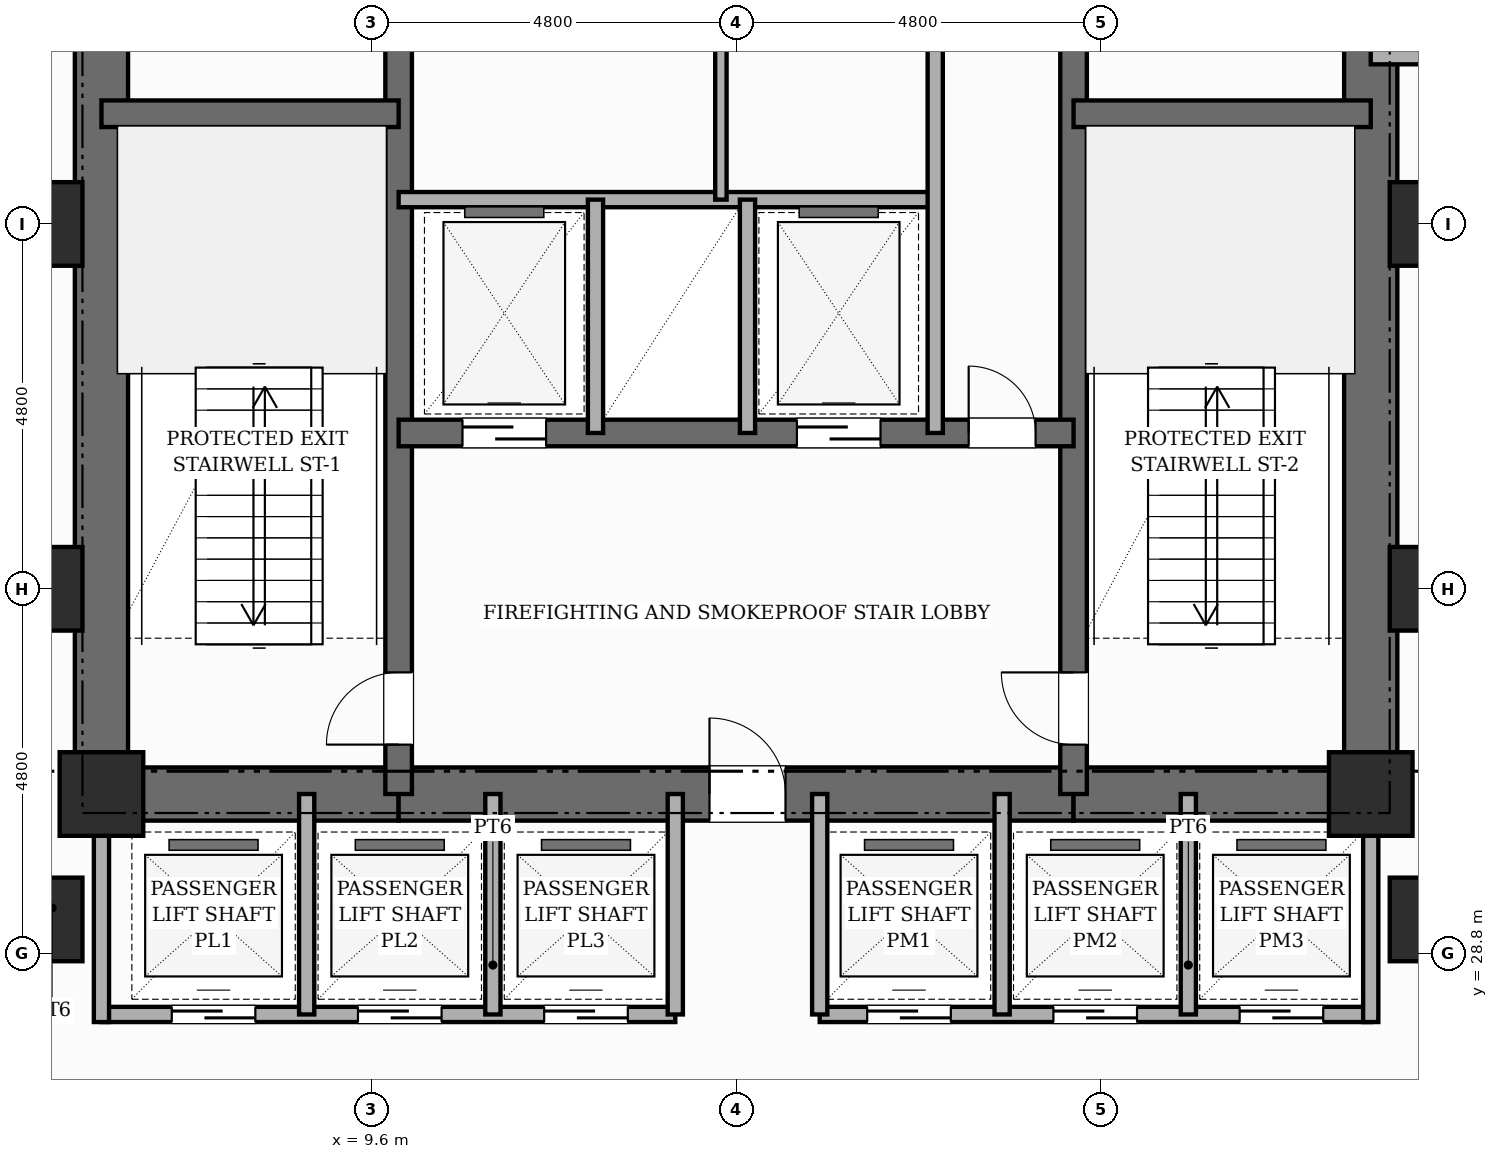
"""IFC4 building model, lengths in metres.
Left out: names, types, materials, properties, quantities, classifications, styles, units other than length and angle.
Written with IfcOpenShell. Run it as: python <this file> out.ifc"""

import sys

from ifc_helpers import new_model, si_unit, direction, frame, frame_2d, origin, origin_2d, place, context, subcontext, project, spatial, rectangle, extrude, element, fill, save


model = new_model("IFC4")
c1 = context("Model", 3, precision=1e-05, world=origin(), true_north=direction((0.0, 1.0)))
c2 = subcontext(c1, "Body", "Model", "MODEL_VIEW")
j1 = project(units=[si_unit("LENGTHUNIT", "METRE"), si_unit("PLANEANGLEUNIT", "RADIAN")], contexts=[c1])
p1 = place(None, origin())
s1 = spatial("IfcSite", under=j1, at=p1, CompositionType="ELEMENT")
p2 = place(p1, origin())
s2 = spatial("IfcBuilding", under=s1, at=p2, CompositionType="ELEMENT")
p3 = place(p2, frame((0.0, 0.0, 97.0)))
s3 = spatial("IfcBuildingStorey", under=s2, at=p3, CompositionType="ELEMENT", Elevation=97.0)
p4 = place(p3, frame((6.05, 30.55, 0.0), z_axis=(0.0, 0.0, 1.0), x_axis=(0.0, 1.0, 0.0)))
e1 = element("IfcWall", 1, at=p4, inside=s3, PredefinedType="SHEAR", context=c2, shape_type="SweptSolid", body=[
    extrude(rectangle(XDim=15.6, YDim=0.7, at=frame_2d((7.8, 0.0))), origin(), (0.0, 0.0, 1.0), 4.8),
])
p5 = place(p3, frame((22.75, 30.55, 0.0), z_axis=(0.0, 0.0, 1.0), x_axis=(0.0, 1.0, 0.0)))
e2 = element("IfcWall", 2, at=p5, inside=s3, PredefinedType="SHEAR", context=c2, shape_type="SweptSolid", body=[
    extrude(rectangle(XDim=15.6, YDim=0.7, at=frame_2d((7.8, 0.0))), origin(), (0.0, 0.0, 1.0), 4.8),
])
p6 = place(p5, frame((10.8, 0.0, 0.0)))
e3 = element("IfcOpeningElement", 3, at=p6, cuts=e2, PredefinedType="OPENING", context=c2, shape_type="SweptSolid", body=[
    extrude(rectangle(XDim=1.0, YDim=2.15, at=frame_2d((0.5, 1.075))), frame((0.0, 0.36, 0.0), z_axis=(0.0, -1.0, 0.0), x_axis=(1.0, 0.0, 0.0)), (0.0, 0.0, 1.0), 0.72),
])
p7 = place(p3, frame((6.05, 30.9, 0.0), z_axis=(0.0, 0.0, 1.0), x_axis=(1.0, 0.0, 0.0)))
e4 = element("IfcWall", 4, at=p7, inside=s3, PredefinedType="SHEAR", context=c2, shape_type="SweptSolid", body=[
    extrude(rectangle(XDim=3.91, YDim=0.7, at=frame_2d((1.955, 0.0))), origin(), (0.0, 0.0, 1.0), 4.8),
])
p8 = place(p3, frame((9.96, 30.9, 0.0), z_axis=(0.0, 0.0, 1.0), x_axis=(1.0, 0.0, 0.0)))
e5 = element("IfcWall", 5, at=p8, inside=s3, PredefinedType="SHEAR", context=c2, shape_type="SweptSolid", body=[
    extrude(rectangle(XDim=8.88, YDim=0.7, at=frame_2d((4.44, 0.0))), origin(), (0.0, 0.0, 1.0), 4.8),
])
p9 = place(p8, frame((4.09, 0.0, 0.0)))
e6 = element("IfcOpeningElement", 6, at=p9, cuts=e5, PredefinedType="OPENING", context=c2, shape_type="SweptSolid", body=[
    extrude(rectangle(XDim=1.0, YDim=2.15, at=frame_2d((0.5, 1.075))), frame((0.0, 0.36, 0.0), z_axis=(0.0, -1.0, 0.0), x_axis=(1.0, 0.0, 0.0)), (0.0, 0.0, 1.0), 0.72),
])
p10 = place(p3, frame((18.84, 30.9, 0.0), z_axis=(0.0, 0.0, 1.0), x_axis=(1.0, 0.0, 0.0)))
e7 = element("IfcWall", 7, at=p10, inside=s3, PredefinedType="SHEAR", context=c2, shape_type="SweptSolid", body=[
    extrude(rectangle(XDim=3.91, YDim=0.7, at=frame_2d((1.955, 0.0))), origin(), (0.0, 0.0, 1.0), 4.8),
])
p11 = place(p3, frame((9.96, 30.9, 0.0), z_axis=(0.0, 0.0, 1.0), x_axis=(0.0, 1.0, 0.0)))
e8 = element("IfcWall", 8, at=p11, inside=s3, PredefinedType="SHEAR", context=c2, shape_type="SweptSolid", body=[
    extrude(rectangle(XDim=14.9, YDim=0.35, at=frame_2d((7.45, 0.0))), origin(), (0.0, 0.0, 1.0), 4.8),
])
p12 = place(p11, frame((0.65, 0.0, 0.0)))
e9 = element("IfcOpeningElement", 9, at=p12, cuts=e8, PredefinedType="OPENING", context=c2, shape_type="SweptSolid", body=[
    extrude(rectangle(XDim=0.95, YDim=2.1, at=frame_2d((0.475, 1.05))), frame((0.0, 0.185, 0.0), z_axis=(0.0, -1.0, 0.0), x_axis=(1.0, 0.0, 0.0)), (0.0, 0.0, 1.0), 0.37),
])
p13 = place(p11, frame((10.45, 0.0, 0.0)))
e10 = element("IfcOpeningElement", 10, at=p13, cuts=e8, PredefinedType="OPENING", context=c2, shape_type="SweptSolid", body=[
    extrude(rectangle(XDim=1.0, YDim=2.15, at=frame_2d((0.5, 1.075))), frame((0.0, 0.185, 0.0), z_axis=(0.0, -1.0, 0.0), x_axis=(1.0, 0.0, 0.0)), (0.0, 0.0, 1.0), 0.37),
])
p14 = place(p3, frame((18.84, 30.9, 0.0), z_axis=(0.0, 0.0, 1.0), x_axis=(0.0, 1.0, 0.0)))
e11 = element("IfcWall", 11, at=p14, inside=s3, PredefinedType="SHEAR", context=c2, shape_type="SweptSolid", body=[
    extrude(rectangle(XDim=14.9, YDim=0.35, at=frame_2d((7.45, 0.0))), origin(), (0.0, 0.0, 1.0), 4.8),
])
p15 = place(p14, frame((0.65, 0.0, 0.0)))
e12 = element("IfcOpeningElement", 12, at=p15, cuts=e11, PredefinedType="OPENING", context=c2, shape_type="SweptSolid", body=[
    extrude(rectangle(XDim=0.95, YDim=2.1, at=frame_2d((0.475, 1.05))), frame((0.0, 0.185, 0.0), z_axis=(0.0, -1.0, 0.0), x_axis=(1.0, 0.0, 0.0)), (0.0, 0.0, 1.0), 0.37),
])
p16 = place(p14, frame((10.45, 0.0, 0.0)))
e13 = element("IfcOpeningElement", 13, at=p16, cuts=e11, PredefinedType="OPENING", context=c2, shape_type="SweptSolid", body=[
    extrude(rectangle(XDim=1.0, YDim=2.15, at=frame_2d((0.5, 1.075))), frame((0.0, 0.185, 0.0), z_axis=(0.0, -1.0, 0.0), x_axis=(1.0, 0.0, 0.0)), (0.0, 0.0, 1.0), 0.37),
])
for number, where, z_axis, x_axis in (
    (14, (6.05, 39.85, 0.0), (0.0, 0.0, 1.0), (1.0, 0.0, 0.0)),
    (15, (18.84, 39.85, 0.0), (0.0, 0.0, 1.0), (1.0, 0.0, 0.0)),
):
    element("IfcWall", number, at=place(p3, frame(where, z_axis=z_axis, x_axis=x_axis)), inside=s3, PredefinedType="SHEAR", context=c2, shape_type="SweptSolid", body=[
        extrude(rectangle(XDim=3.91, YDim=0.35, at=frame_2d((1.955, 0.0))), origin(), (0.0, 0.0, 1.0), 4.8),
    ])
p17 = place(p3, frame((9.96, 35.65, 0.0), z_axis=(0.0, 0.0, 1.0), x_axis=(1.0, 0.0, 0.0)))
e16 = element("IfcWall", 16, at=p17, inside=s3, PredefinedType="SHEAR", context=c2, shape_type="SweptSolid", body=[
    extrude(rectangle(XDim=8.88, YDim=0.35, at=frame_2d((4.44, 0.0))), origin(), (0.0, 0.0, 1.0), 4.8),
])
p18 = place(p17, frame((0.84, 0.0, 0.0)))
e17 = element("IfcOpeningElement", 17, at=p18, cuts=e16, PredefinedType="OPENING", context=c2, shape_type="SweptSolid", body=[
    extrude(rectangle(XDim=1.1, YDim=2.15, at=frame_2d((0.55, 1.075))), frame((0.0, 0.185, 0.0), z_axis=(0.0, -1.0, 0.0), x_axis=(1.0, 0.0, 0.0)), (0.0, 0.0, 1.0), 0.37),
])
p19 = place(p17, frame((5.24, 0.0, 0.0)))
e18 = element("IfcOpeningElement", 18, at=p19, cuts=e16, PredefinedType="OPENING", context=c2, shape_type="SweptSolid", body=[
    extrude(rectangle(XDim=1.1, YDim=2.15, at=frame_2d((0.55, 1.075))), frame((0.0, 0.185, 0.0), z_axis=(0.0, -1.0, 0.0), x_axis=(1.0, 0.0, 0.0)), (0.0, 0.0, 1.0), 0.37),
])
p20 = place(p17, frame((7.5, 0.0, 0.0)))
e19 = element("IfcOpeningElement", 19, at=p20, cuts=e16, PredefinedType="OPENING", context=c2, shape_type="SweptSolid", body=[
    extrude(rectangle(XDim=0.88, YDim=2.1, at=frame_2d((0.44, 1.05))), frame((0.0, 0.185, 0.0), z_axis=(0.0, -1.0, 0.0), x_axis=(1.0, 0.0, 0.0)), (0.0, 0.0, 1.0), 0.37),
])
for number, where, z_axis, x_axis in (
    (20, (5.25, 29.25, 0.0), (0.0, 0.0, 1.0), (1.0, 0.0, 0.0)),
    (21, (5.25, 33.6, 0.0), (0.0, 0.0, 1.0), (1.0, 0.0, 0.0)),
    (22, (5.25, 38.4, 0.0), (0.0, 0.0, 1.0), (1.0, 0.0, 0.0)),
    (23, (6.05, 30.9, 0.0), (0.0, 0.0, 1.0), (1.0, 0.0, 0.0)),
    (24, (22.75, 30.9, 0.0), (0.0, 0.0, 1.0), (1.0, 0.0, 0.0)),
    (25, (23.55, 29.25, 0.0), (0.0, 0.0, 1.0), (1.0, 0.0, 0.0)),
    (26, (23.55, 33.6, 0.0), (0.0, 0.0, 1.0), (1.0, 0.0, 0.0)),
    (27, (23.55, 38.4, 0.0), (0.0, 0.0, 1.0), (1.0, 0.0, 0.0)),
):
    element("IfcColumn", number, at=place(p3, frame(where, z_axis=z_axis, x_axis=x_axis)), inside=s3, PredefinedType="COLUMN", context=c2, shape_type="SweptSolid", body=[
        extrude(rectangle(XDim=1.1, YDim=1.1, at=origin_2d()), origin(), (0.0, 0.0, 1.0), 4.8),
    ])
p21 = place(p3, frame((9.96, 38.72, 0.0), z_axis=(0.0, 0.0, 1.0), x_axis=(1.0, 0.0, 0.0)))
e28 = element("IfcWall", 28, at=p21, inside=s3, PredefinedType="POLYGONAL", context=c2, shape_type="SweptSolid", body=[
    extrude(rectangle(XDim=7.06, YDim=0.2, at=frame_2d((3.53, 0.0))), origin(), (0.0, 0.0, 1.0), 4.5),
])
for number, where, z_axis, x_axis in (
    (29, (12.55, 35.65, 0.0), (0.0, 0.0, 1.0), (0.0, 1.0, 0.0)),
    (30, (14.55, 35.65, 0.0), (0.0, 0.0, 1.0), (0.0, 1.0, 0.0)),
):
    element("IfcWall", number, at=place(p3, frame(where, z_axis=z_axis, x_axis=x_axis)), inside=s3, PredefinedType="POLYGONAL", context=c2, shape_type="SweptSolid", body=[
        extrude(rectangle(XDim=3.07, YDim=0.2, at=frame_2d((1.535, 0.0))), origin(), (0.0, 0.0, 1.0), 4.5),
    ])
p22 = place(p3, frame((17.02, 35.65, 0.0), z_axis=(0.0, 0.0, 1.0), x_axis=(0.0, 1.0, 0.0)))
e31 = element("IfcWall", 31, at=p22, inside=s3, PredefinedType="POLYGONAL", context=c2, shape_type="SweptSolid", body=[
    extrude(rectangle(XDim=5.15, YDim=0.2, at=frame_2d((2.575, 0.0))), origin(), (0.0, 0.0, 1.0), 4.5),
])
p23 = place(p3, frame((14.2, 38.72, 0.0), z_axis=(0.0, 0.0, 1.0), x_axis=(0.0, 1.0, 0.0)))
e32 = element("IfcWall", 32, at=p23, inside=s3, PredefinedType="PARTITIONING", context=c2, shape_type="SweptSolid", body=[
    extrude(rectangle(XDim=2.08, YDim=0.15, at=frame_2d((1.04, 0.0))), origin(), (0.0, 0.0, 1.0), 4.5),
])
p24 = place(p3, frame((6.05, 28.0, 0.0), z_axis=(0.0, 0.0, 1.0), x_axis=(1.0, 0.0, 0.0)))
e33 = element("IfcWall", 33, at=p24, inside=s3, PredefinedType="POLYGONAL", context=c2, shape_type="SweptSolid", body=[
    extrude(rectangle(XDim=7.55, YDim=0.2, at=frame_2d((3.775, 0.0))), origin(), (0.0, 0.0, 1.0), 4.5),
])
p25 = place(p24, frame((0.925, 0.0, 0.0)))
e34 = element("IfcOpeningElement", 34, at=p25, cuts=e33, PredefinedType="OPENING", context=c2, shape_type="SweptSolid", body=[
    extrude(rectangle(XDim=1.1, YDim=2.15, at=frame_2d((0.55, 1.075))), frame((0.0, 0.11, 0.0), z_axis=(0.0, -1.0, 0.0), x_axis=(1.0, 0.0, 0.0)), (0.0, 0.0, 1.0), 0.22),
])
p26 = place(p24, frame((3.375, 0.0, 0.0)))
e35 = element("IfcOpeningElement", 35, at=p26, cuts=e33, PredefinedType="OPENING", context=c2, shape_type="SweptSolid", body=[
    extrude(rectangle(XDim=1.1, YDim=2.15, at=frame_2d((0.55, 1.075))), frame((0.0, 0.11, 0.0), z_axis=(0.0, -1.0, 0.0), x_axis=(1.0, 0.0, 0.0)), (0.0, 0.0, 1.0), 0.22),
])
p27 = place(p24, frame((5.825, 0.0, 0.0)))
e36 = element("IfcOpeningElement", 36, at=p27, cuts=e33, PredefinedType="OPENING", context=c2, shape_type="SweptSolid", body=[
    extrude(rectangle(XDim=1.1, YDim=2.15, at=frame_2d((0.55, 1.075))), frame((0.0, 0.11, 0.0), z_axis=(0.0, -1.0, 0.0), x_axis=(1.0, 0.0, 0.0)), (0.0, 0.0, 1.0), 0.22),
])
p28 = place(p3, frame((15.5, 28.0, 0.0), z_axis=(0.0, 0.0, 1.0), x_axis=(1.0, 0.0, 0.0)))
e37 = element("IfcWall", 37, at=p28, inside=s3, PredefinedType="POLYGONAL", context=c2, shape_type="SweptSolid", body=[
    extrude(rectangle(XDim=7.25, YDim=0.2, at=frame_2d((3.625, 0.0))), origin(), (0.0, 0.0, 1.0), 4.5),
])
p29 = place(p28, frame((0.625, 0.0, 0.0)))
e38 = element("IfcOpeningElement", 38, at=p29, cuts=e37, PredefinedType="OPENING", context=c2, shape_type="SweptSolid", body=[
    extrude(rectangle(XDim=1.1, YDim=2.15, at=frame_2d((0.55, 1.075))), frame((0.0, 0.11, 0.0), z_axis=(0.0, -1.0, 0.0), x_axis=(1.0, 0.0, 0.0)), (0.0, 0.0, 1.0), 0.22),
])
p30 = place(p28, frame((3.075, 0.0, 0.0)))
e39 = element("IfcOpeningElement", 39, at=p30, cuts=e37, PredefinedType="OPENING", context=c2, shape_type="SweptSolid", body=[
    extrude(rectangle(XDim=1.1, YDim=2.15, at=frame_2d((0.55, 1.075))), frame((0.0, 0.11, 0.0), z_axis=(0.0, -1.0, 0.0), x_axis=(1.0, 0.0, 0.0)), (0.0, 0.0, 1.0), 0.22),
])
p31 = place(p28, frame((5.525, 0.0, 0.0)))
e40 = element("IfcOpeningElement", 40, at=p31, cuts=e37, PredefinedType="OPENING", context=c2, shape_type="SweptSolid", body=[
    extrude(rectangle(XDim=1.1, YDim=2.15, at=frame_2d((0.55, 1.075))), frame((0.0, 0.11, 0.0), z_axis=(0.0, -1.0, 0.0), x_axis=(1.0, 0.0, 0.0)), (0.0, 0.0, 1.0), 0.22),
])
for number, where, z_axis, x_axis in (
    (41, (6.05, 27.9, 0.0), (0.0, 0.0, 1.0), (0.0, 1.0, 0.0)),
    (42, (22.75, 27.9, 0.0), (0.0, 0.0, 1.0), (0.0, 1.0, 0.0)),
):
    element("IfcWall", number, at=place(p3, frame(where, z_axis=z_axis, x_axis=x_axis)), inside=s3, PredefinedType="POLYGONAL", context=c2, shape_type="SweptSolid", body=[
        extrude(rectangle(XDim=3.0, YDim=0.2, at=frame_2d((1.5, 0.0))), origin(), (0.0, 0.0, 1.0), 4.5),
    ])
for number, where, z_axis, x_axis in (
    (43, (13.6, 28.0, 0.0), (0.0, 0.0, 1.0), (0.0, 1.0, 0.0)),
    (44, (15.5, 28.0, 0.0), (0.0, 0.0, 1.0), (0.0, 1.0, 0.0)),
    (45, (8.75, 28.0, 0.0), (0.0, 0.0, 1.0), (0.0, 1.0, 0.0)),
    (46, (11.2, 28.0, 0.0), (0.0, 0.0, 1.0), (0.0, 1.0, 0.0)),
    (47, (17.9, 28.0, 0.0), (0.0, 0.0, 1.0), (0.0, 1.0, 0.0)),
    (48, (20.35, 28.0, 0.0), (0.0, 0.0, 1.0), (0.0, 1.0, 0.0)),
):
    element("IfcWall", number, at=place(p3, frame(where, z_axis=z_axis, x_axis=x_axis)), inside=s3, PredefinedType="POLYGONAL", context=c2, shape_type="SweptSolid", body=[
        extrude(rectangle(XDim=2.9, YDim=0.2, at=frame_2d((1.45, 0.0))), origin(), (0.0, 0.0, 1.0), 4.5),
    ])
p32 = place(p3, frame((22.75, 40.6, 0.0), z_axis=(0.0, 0.0, 1.0), x_axis=(1.0, 0.0, 0.0)))
e49 = element("IfcWall", 49, at=p32, inside=s3, PredefinedType="PARTITIONING", context=c2, shape_type="SweptSolid", body=[
    extrude(rectangle(XDim=3.33, YDim=0.2, at=frame_2d((1.665, 0.0))), origin(), (0.0, 0.0, 1.0), 4.5),
])
p33 = place(p32, frame((0.88, 0.0, 0.0)))
e50 = element("IfcOpeningElement", 50, at=p33, cuts=e49, PredefinedType="OPENING", context=c2, shape_type="SweptSolid", body=[
    extrude(rectangle(XDim=0.86, YDim=2.1, at=frame_2d((0.43, 1.05))), frame((0.0, 0.11, 0.0), z_axis=(0.0, -1.0, 0.0), x_axis=(1.0, 0.0, 0.0)), (0.0, 0.0, 1.0), 0.22),
])
p34 = place(p12, origin())
e51 = element("IfcDoor", 51, at=p34, inside=s3, OperationType="SINGLE_SWING_LEFT", PredefinedType="DOOR", context=c2, shape_type="SweptSolid", body=[
    extrude(rectangle(XDim=0.95, YDim=2.1, at=frame_2d((0.475, 1.05))), frame((0.0, 0.025, 0.0), z_axis=(0.0, -1.0, 0.0), x_axis=(1.0, 0.0, 0.0)), (0.0, 0.0, 1.0), 0.05),
])
fill(e9, e51)
p35 = place(p15, origin())
e52 = element("IfcDoor", 52, at=p35, inside=s3, OperationType="SINGLE_SWING_RIGHT", PredefinedType="DOOR", context=c2, shape_type="SweptSolid", body=[
    extrude(rectangle(XDim=0.95, YDim=2.1, at=frame_2d((0.475, 1.05))), frame((0.0, 0.025, 0.0), z_axis=(0.0, -1.0, 0.0), x_axis=(1.0, 0.0, 0.0)), (0.0, 0.0, 1.0), 0.05),
])
fill(e12, e52)
p36 = place(p9, origin())
e53 = element("IfcDoor", 53, at=p36, inside=s3, OperationType="SINGLE_SWING_LEFT", PredefinedType="DOOR", context=c2, shape_type="SweptSolid", body=[
    extrude(rectangle(XDim=1.0, YDim=2.15, at=frame_2d((0.5, 1.075))), frame((0.0, 0.025, 0.0), z_axis=(0.0, -1.0, 0.0), x_axis=(1.0, 0.0, 0.0)), (0.0, 0.0, 1.0), 0.05),
])
fill(e6, e53)
p37 = place(p18, origin())
e54 = element("IfcDoor", 54, at=p37, inside=s3, OperationType="SLIDING_TO_LEFT", PredefinedType="DOOR", context=c2, shape_type="SweptSolid", body=[
    extrude(rectangle(XDim=1.1, YDim=2.15, at=frame_2d((0.55, 1.075))), frame((0.0, 0.025, 0.0), z_axis=(0.0, -1.0, 0.0), x_axis=(1.0, 0.0, 0.0)), (0.0, 0.0, 1.0), 0.05),
])
fill(e17, e54)
p38 = place(p19, origin())
e55 = element("IfcDoor", 55, at=p38, inside=s3, OperationType="SLIDING_TO_RIGHT", PredefinedType="DOOR", context=c2, shape_type="SweptSolid", body=[
    extrude(rectangle(XDim=1.1, YDim=2.15, at=frame_2d((0.55, 1.075))), frame((0.0, 0.025, 0.0), z_axis=(0.0, -1.0, 0.0), x_axis=(1.0, 0.0, 0.0)), (0.0, 0.0, 1.0), 0.05),
])
fill(e18, e55)
p39 = place(p20, origin())
e56 = element("IfcDoor", 56, at=p39, inside=s3, OperationType="SINGLE_SWING_LEFT", PredefinedType="DOOR", context=c2, shape_type="SweptSolid", body=[
    extrude(rectangle(XDim=0.88, YDim=2.1, at=frame_2d((0.44, 1.05))), frame((0.0, 0.025, 0.0), z_axis=(0.0, -1.0, 0.0), x_axis=(1.0, 0.0, 0.0)), (0.0, 0.0, 1.0), 0.05),
])
fill(e19, e56)
p40 = place(p25, origin())
e57 = element("IfcDoor", 57, at=p40, inside=s3, OperationType="SLIDING_TO_LEFT", PredefinedType="DOOR", context=c2, shape_type="SweptSolid", body=[
    extrude(rectangle(XDim=1.1, YDim=2.15, at=frame_2d((0.55, 1.075))), frame((0.0, 0.025, 0.0), z_axis=(0.0, -1.0, 0.0), x_axis=(1.0, 0.0, 0.0)), (0.0, 0.0, 1.0), 0.05),
])
fill(e34, e57)
p41 = place(p26, origin())
e58 = element("IfcDoor", 58, at=p41, inside=s3, OperationType="SLIDING_TO_RIGHT", PredefinedType="DOOR", context=c2, shape_type="SweptSolid", body=[
    extrude(rectangle(XDim=1.1, YDim=2.15, at=frame_2d((0.55, 1.075))), frame((0.0, 0.025, 0.0), z_axis=(0.0, -1.0, 0.0), x_axis=(1.0, 0.0, 0.0)), (0.0, 0.0, 1.0), 0.05),
])
fill(e35, e58)
p42 = place(p27, origin())
e59 = element("IfcDoor", 59, at=p42, inside=s3, OperationType="SLIDING_TO_LEFT", PredefinedType="DOOR", context=c2, shape_type="SweptSolid", body=[
    extrude(rectangle(XDim=1.1, YDim=2.15, at=frame_2d((0.55, 1.075))), frame((0.0, 0.025, 0.0), z_axis=(0.0, -1.0, 0.0), x_axis=(1.0, 0.0, 0.0)), (0.0, 0.0, 1.0), 0.05),
])
fill(e36, e59)
p43 = place(p29, origin())
e60 = element("IfcDoor", 60, at=p43, inside=s3, OperationType="SLIDING_TO_RIGHT", PredefinedType="DOOR", context=c2, shape_type="SweptSolid", body=[
    extrude(rectangle(XDim=1.1, YDim=2.15, at=frame_2d((0.55, 1.075))), frame((0.0, 0.025, 0.0), z_axis=(0.0, -1.0, 0.0), x_axis=(1.0, 0.0, 0.0)), (0.0, 0.0, 1.0), 0.05),
])
fill(e38, e60)
p44 = place(p30, origin())
e61 = element("IfcDoor", 61, at=p44, inside=s3, OperationType="SLIDING_TO_LEFT", PredefinedType="DOOR", context=c2, shape_type="SweptSolid", body=[
    extrude(rectangle(XDim=1.1, YDim=2.15, at=frame_2d((0.55, 1.075))), frame((0.0, 0.025, 0.0), z_axis=(0.0, -1.0, 0.0), x_axis=(1.0, 0.0, 0.0)), (0.0, 0.0, 1.0), 0.05),
])
fill(e39, e61)
p45 = place(p31, origin())
e62 = element("IfcDoor", 62, at=p45, inside=s3, OperationType="SLIDING_TO_RIGHT", PredefinedType="DOOR", context=c2, shape_type="SweptSolid", body=[
    extrude(rectangle(XDim=1.1, YDim=2.15, at=frame_2d((0.55, 1.075))), frame((0.0, 0.025, 0.0), z_axis=(0.0, -1.0, 0.0), x_axis=(1.0, 0.0, 0.0)), (0.0, 0.0, 1.0), 0.05),
])
fill(e40, e62)
save(model, sys.argv[1])
